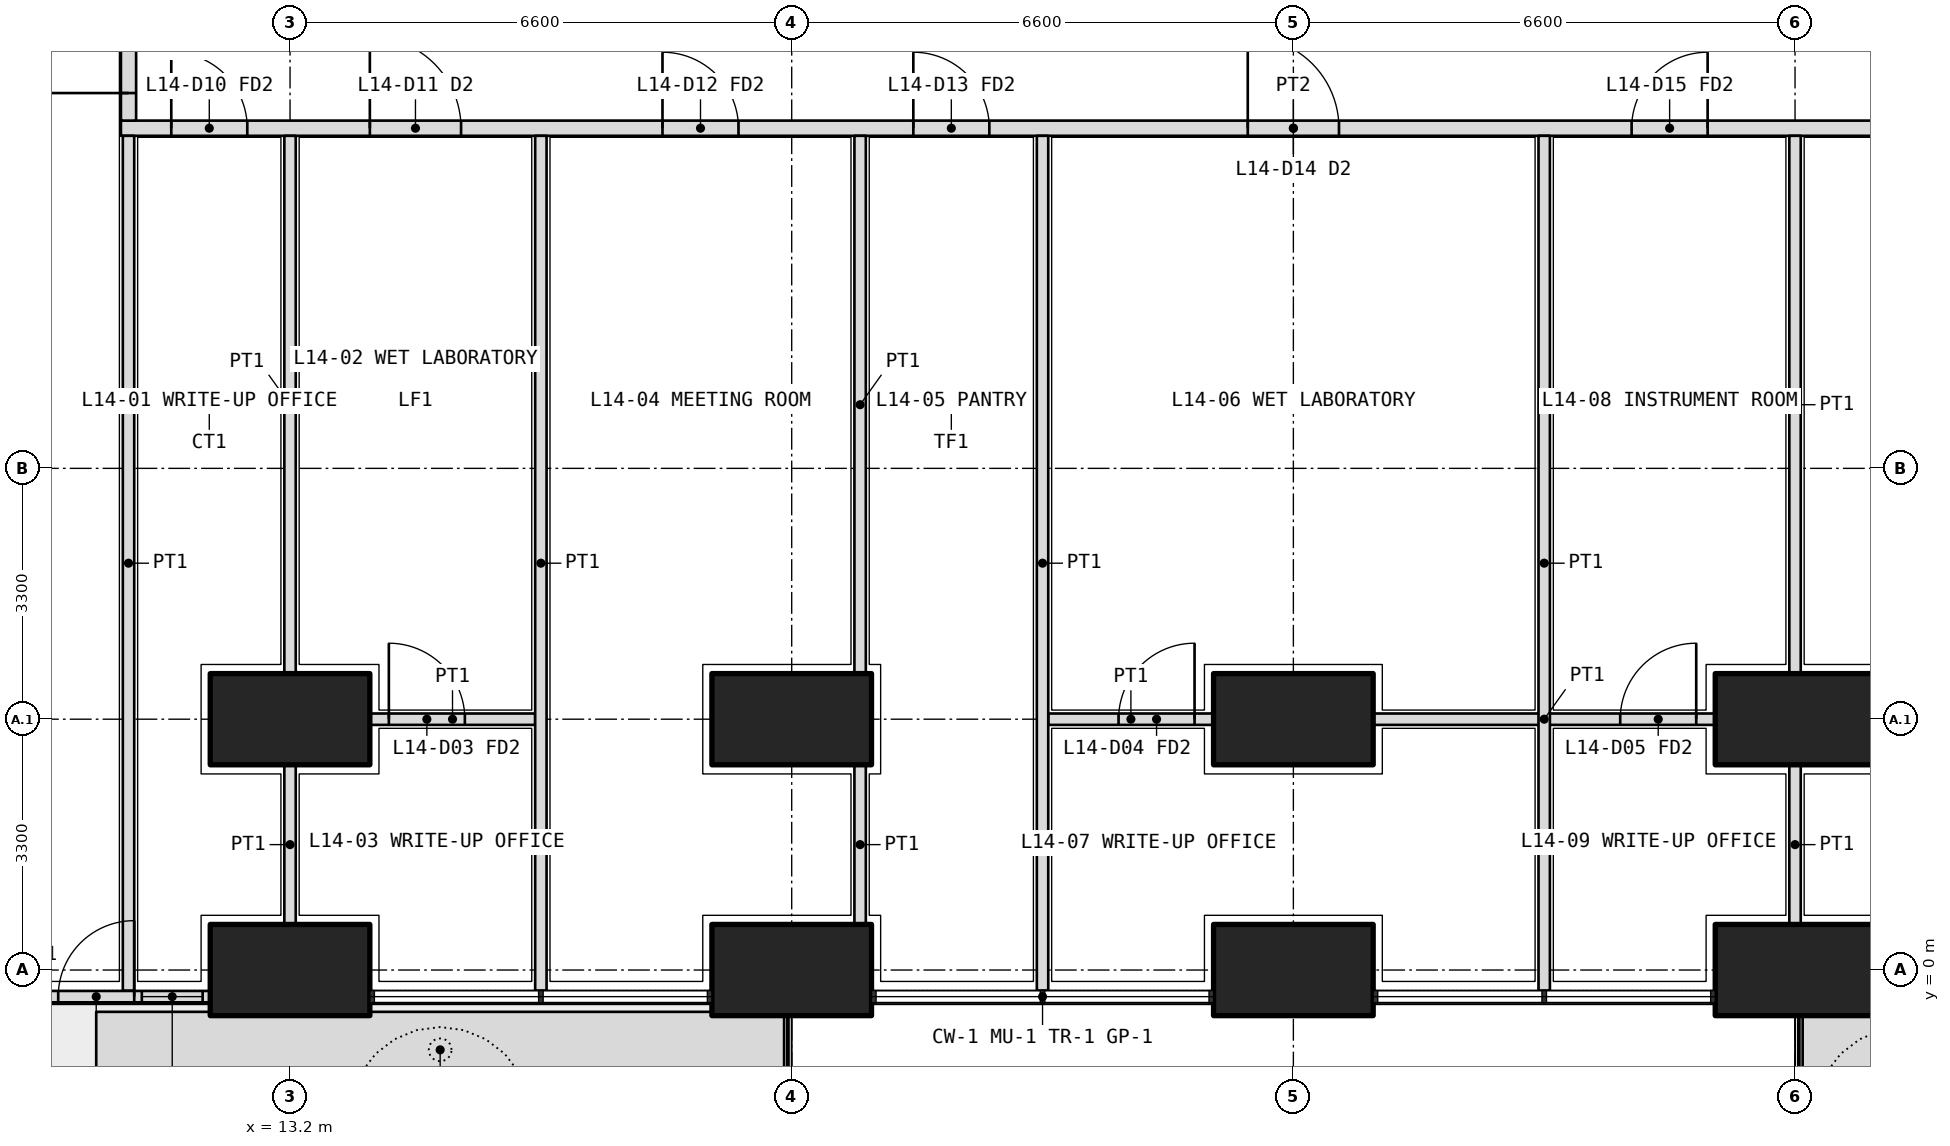
"""IFC4 building model, lengths in metres.
Left out: names, types, materials, properties, quantities, classifications, styles, units other than length and angle.
Written with IfcOpenShell. Run it as: python <this file> out.ifc"""

import sys

from ifc_helpers import new_model, si_unit, direction, frame, frame_2d, origin, origin_2d, place, context, subcontext, project, spatial, polyline, rectangle, outline, extrude, element, fill, save


model = new_model("IFC4")
c1 = context("Model", 3, precision=1e-05, world=origin(), true_north=direction((0.0, 1.0)))
c2 = subcontext(c1, "Body", "Model", "MODEL_VIEW")
j1 = project(units=[si_unit("LENGTHUNIT", "METRE"), si_unit("PLANEANGLEUNIT", "RADIAN")], contexts=[c1])
p1 = place(None, origin())
s1 = spatial("IfcSite", under=j1, at=p1, CompositionType="ELEMENT")
p2 = place(p1, origin())
s2 = spatial("IfcBuilding", under=s1, at=p2, CompositionType="ELEMENT")
p3 = place(p2, frame((0.0, 0.0, 63.3)))
s3 = spatial("IfcBuildingStorey", under=s2, at=p3, CompositionType="ELEMENT", Elevation=63.3)
for number, where, z_axis, x_axis in (
    (1, (13.2, 0.0, 0.0), (0.0, 0.0, 1.0), (1.0, 0.0, 0.0)),
    (2, (19.8, 0.0, 0.0), (0.0, 0.0, 1.0), (1.0, 0.0, 0.0)),
    (3, (26.4, 0.0, 0.0), (0.0, 0.0, 1.0), (1.0, 0.0, 0.0)),
    (4, (33.0, 0.0, 0.0), (0.0, 0.0, 1.0), (1.0, 0.0, 0.0)),
    (5, (13.2, 3.3, 0.0), (0.0, 0.0, 1.0), (1.0, 0.0, 0.0)),
    (6, (19.8, 3.3, 0.0), (0.0, 0.0, 1.0), (1.0, 0.0, 0.0)),
    (7, (26.4, 3.3, 0.0), (0.0, 0.0, 1.0), (1.0, 0.0, 0.0)),
    (8, (33.0, 3.3, 0.0), (0.0, 0.0, 1.0), (1.0, 0.0, 0.0)),
):
    element("IfcColumn", number, at=place(p3, frame(where, z_axis=z_axis, x_axis=x_axis)), inside=s3, PredefinedType="COLUMN", context=c2, shape_type="SweptSolid", body=[
        extrude(rectangle(XDim=2.1, YDim=1.2, at=origin_2d()), origin(), (0.0, 0.0, 1.0), 4.2),
    ])
p4 = place(p3, origin())
e9 = element("IfcWall", 9, at=p4, inside=s3, PredefinedType="USERDEFINED", context=c2, shape_type="SweptSolid", body=[
    extrude(outline(polyline([(10.65, -1.55), (19.7, -1.55), (19.7, -0.55), (10.65, -0.55), (10.65, -1.55)]), holes=[polyline([(10.8, -1.4), (19.55, -1.4), (19.55, -0.7), (10.8, -0.7), (10.8, -1.4)])]), origin(), (0.0, 0.0, 1.0), 1.05),
])
p5 = place(p3, origin())
e10 = element("IfcWall", 10, at=p5, inside=s3, PredefinedType="USERDEFINED", context=c2, shape_type="SweptSolid", body=[
    extrude(outline(polyline([(33.1, -1.55), (35.55, -1.55), (35.55, -0.55), (33.1, -0.55), (33.1, -1.55)]), holes=[polyline([(33.25, -1.4), (35.4, -1.4), (35.4, -0.7), (33.25, -0.7), (33.25, -1.4)])]), origin(), (0.0, 0.0, 1.0), 1.05),
])
p6 = place(p3, frame((7.65, -0.35, 0.0), z_axis=(0.0, 0.0, 1.0), x_axis=(1.0, 0.0, 0.0)))
e11 = element("IfcWall", 11, at=p6, inside=s3, PredefinedType="SOLIDWALL", context=c2, shape_type="SweptSolid", body=[
    extrude(rectangle(XDim=4.5, YDim=0.15, at=frame_2d((2.25, 0.0))), origin(), (0.0, 0.0, 1.0), 2.6),
])
p7 = place(p6, frame((2.5, 0.0, 0.0)))
e12 = element("IfcOpeningElement", 12, at=p7, cuts=e11, PredefinedType="OPENING", context=c2, shape_type="SweptSolid", body=[
    extrude(rectangle(XDim=1.0, YDim=2.4, at=frame_2d((0.5, 1.2))), frame((0.0, 0.085, 0.0), z_axis=(0.0, -1.0, 0.0), x_axis=(1.0, 0.0, 0.0)), (0.0, 0.0, 1.0), 0.17),
])
p8 = place(p6, frame((0.1, 0.0, 0.1)))
e13 = element("IfcOpeningElement", 13, at=p8, cuts=e11, PredefinedType="OPENING", context=c2, shape_type="SweptSolid", body=[
    extrude(rectangle(XDim=1.9, YDim=2.2, at=frame_2d((0.95, 1.1))), frame((0.0, 0.085, 0.0), z_axis=(0.0, -1.0, 0.0), x_axis=(1.0, 0.0, 0.0)), (0.0, 0.0, 1.0), 0.17),
])
p9 = place(p6, frame((3.6, 0.0, 0.1)))
e14 = element("IfcOpeningElement", 14, at=p9, cuts=e11, PredefinedType="OPENING", context=c2, shape_type="SweptSolid", body=[
    extrude(rectangle(XDim=0.8, YDim=2.2, at=frame_2d((0.4, 1.1))), frame((0.0, 0.085, 0.0), z_axis=(0.0, -1.0, 0.0), x_axis=(1.0, 0.0, 0.0)), (0.0, 0.0, 1.0), 0.17),
])
p10 = place(p3, frame((10.975, 11.075, 0.0), z_axis=(0.0, 0.0, 1.0), x_axis=(1.0, 0.0, 0.0)))
e15 = element("IfcWall", 15, at=p10, inside=s3, PredefinedType="PARTITIONING", context=c2, shape_type="SweptSolid", body=[
    extrude(rectangle(XDim=30.85, YDim=0.2, at=frame_2d((15.425, 0.0))), origin(), (0.0, 0.0, 1.0), 2.85),
])
p11 = place(p10, frame((0.663, 0.0, 0.0)))
e16 = element("IfcOpeningElement", 16, at=p11, cuts=e15, PredefinedType="OPENING", context=c2, shape_type="SweptSolid", body=[
    extrude(rectangle(XDim=1.0, YDim=2.1, at=frame_2d((0.5, 1.05))), frame((0.0, 0.11, 0.0), z_axis=(0.0, -1.0, 0.0), x_axis=(1.0, 0.0, 0.0)), (0.0, 0.0, 1.0), 0.22),
])
p12 = place(p10, frame((3.275, 0.0, 0.0)))
e17 = element("IfcOpeningElement", 17, at=p12, cuts=e15, PredefinedType="OPENING", context=c2, shape_type="SweptSolid", body=[
    extrude(rectangle(XDim=1.2, YDim=2.1, at=frame_2d((0.6, 1.05))), frame((0.0, 0.11, 0.0), z_axis=(0.0, -1.0, 0.0), x_axis=(1.0, 0.0, 0.0)), (0.0, 0.0, 1.0), 0.22),
])
p13 = place(p10, frame((7.125, 0.0, 0.0)))
e18 = element("IfcOpeningElement", 18, at=p13, cuts=e15, PredefinedType="OPENING", context=c2, shape_type="SweptSolid", body=[
    extrude(rectangle(XDim=1.0, YDim=2.1, at=frame_2d((0.5, 1.05))), frame((0.0, 0.11, 0.0), z_axis=(0.0, -1.0, 0.0), x_axis=(1.0, 0.0, 0.0)), (0.0, 0.0, 1.0), 0.22),
])
p14 = place(p10, frame((10.425, 0.0, 0.0)))
e19 = element("IfcOpeningElement", 19, at=p14, cuts=e15, PredefinedType="OPENING", context=c2, shape_type="SweptSolid", body=[
    extrude(rectangle(XDim=1.0, YDim=2.1, at=frame_2d((0.5, 1.05))), frame((0.0, 0.11, 0.0), z_axis=(0.0, -1.0, 0.0), x_axis=(1.0, 0.0, 0.0)), (0.0, 0.0, 1.0), 0.22),
])
p15 = place(p10, frame((14.825, 0.0, 0.0)))
e20 = element("IfcOpeningElement", 20, at=p15, cuts=e15, PredefinedType="OPENING", context=c2, shape_type="SweptSolid", body=[
    extrude(rectangle(XDim=1.2, YDim=2.1, at=frame_2d((0.6, 1.05))), frame((0.0, 0.11, 0.0), z_axis=(0.0, -1.0, 0.0), x_axis=(1.0, 0.0, 0.0)), (0.0, 0.0, 1.0), 0.22),
])
p16 = place(p10, frame((19.875, 0.0, 0.0)))
e21 = element("IfcOpeningElement", 21, at=p16, cuts=e15, PredefinedType="OPENING", context=c2, shape_type="SweptSolid", body=[
    extrude(rectangle(XDim=1.0, YDim=2.1, at=frame_2d((0.5, 1.05))), frame((0.0, 0.11, 0.0), z_axis=(0.0, -1.0, 0.0), x_axis=(1.0, 0.0, 0.0)), (0.0, 0.0, 1.0), 0.22),
])
p17 = place(p10, frame((25.887, 0.0, 0.0)))
e22 = element("IfcOpeningElement", 22, at=p17, cuts=e15, PredefinedType="OPENING", context=c2, shape_type="SweptSolid", body=[
    extrude(rectangle(XDim=1.0, YDim=2.1, at=frame_2d((0.5, 1.05))), frame((0.0, 0.11, 0.0), z_axis=(0.0, -1.0, 0.0), x_axis=(1.0, 0.0, 0.0)), (0.0, 0.0, 1.0), 0.22),
])
p18 = place(p3, frame((11.075, 11.175, 0.0), z_axis=(0.0, 0.0, 1.0), x_axis=(0.0, 1.0, 0.0)))
e23 = element("IfcWall", 23, at=p18, inside=s3, PredefinedType="PARTITIONING", context=c2, shape_type="SweptSolid", body=[
    extrude(rectangle(XDim=23.85, YDim=0.2, at=frame_2d((11.925, 0.0))), origin(), (0.0, 0.0, 1.0), 2.85),
])
p19 = place(p18, frame((0.363, 0.0, 0.0)))
e24 = element("IfcOpeningElement", 24, at=p19, cuts=e23, PredefinedType="OPENING", context=c2, shape_type="SweptSolid", body=[
    extrude(rectangle(XDim=1.2, YDim=2.1, at=frame_2d((0.6, 1.05))), frame((0.0, 0.11, 0.0), z_axis=(0.0, -1.0, 0.0), x_axis=(1.0, 0.0, 0.0)), (0.0, 0.0, 1.0), 0.22),
])
p20 = place(p18, frame((2.575, 0.0, 0.0)))
e25 = element("IfcOpeningElement", 25, at=p20, cuts=e23, PredefinedType="OPENING", context=c2, shape_type="SweptSolid", body=[
    extrude(rectangle(XDim=1.0, YDim=2.1, at=frame_2d((0.5, 1.05))), frame((0.0, 0.11, 0.0), z_axis=(0.0, -1.0, 0.0), x_axis=(1.0, 0.0, 0.0)), (0.0, 0.0, 1.0), 0.22),
])
p21 = place(p18, frame((5.625, 0.0, 0.0)))
e26 = element("IfcOpeningElement", 26, at=p21, cuts=e23, PredefinedType="OPENING", context=c2, shape_type="SweptSolid", body=[
    extrude(rectangle(XDim=0.9, YDim=2.1, at=frame_2d((0.45, 1.05))), frame((0.0, 0.11, 0.0), z_axis=(0.0, -1.0, 0.0), x_axis=(1.0, 0.0, 0.0)), (0.0, 0.0, 1.0), 0.22),
])
p22 = place(p18, frame((9.425, 0.0, 0.0)))
e27 = element("IfcOpeningElement", 27, at=p22, cuts=e23, PredefinedType="OPENING", context=c2, shape_type="SweptSolid", body=[
    extrude(rectangle(XDim=0.9, YDim=2.1, at=frame_2d((0.45, 1.05))), frame((0.0, 0.11, 0.0), z_axis=(0.0, -1.0, 0.0), x_axis=(1.0, 0.0, 0.0)), (0.0, 0.0, 1.0), 0.22),
])
p23 = place(p18, frame((12.975, 0.0, 0.0)))
e28 = element("IfcOpeningElement", 28, at=p23, cuts=e23, PredefinedType="OPENING", context=c2, shape_type="SweptSolid", body=[
    extrude(rectangle(XDim=1.0, YDim=2.1, at=frame_2d((0.5, 1.05))), frame((0.0, 0.11, 0.0), z_axis=(0.0, -1.0, 0.0), x_axis=(1.0, 0.0, 0.0)), (0.0, 0.0, 1.0), 0.22),
])
p24 = place(p18, frame((18.025, 0.0, 0.0)))
e29 = element("IfcOpeningElement", 29, at=p24, cuts=e23, PredefinedType="OPENING", context=c2, shape_type="SweptSolid", body=[
    extrude(rectangle(XDim=1.0, YDim=2.1, at=frame_2d((0.5, 1.05))), frame((0.0, 0.11, 0.0), z_axis=(0.0, -1.0, 0.0), x_axis=(1.0, 0.0, 0.0)), (0.0, 0.0, 1.0), 0.22),
])
p25 = place(p18, frame((22.387, 0.0, 0.0)))
e30 = element("IfcOpeningElement", 30, at=p25, cuts=e23, PredefinedType="OPENING", context=c2, shape_type="SweptSolid", body=[
    extrude(rectangle(XDim=1.0, YDim=2.1, at=frame_2d((0.5, 1.05))), frame((0.0, 0.11, 0.0), z_axis=(0.0, -1.0, 0.0), x_axis=(1.0, 0.0, 0.0)), (0.0, 0.0, 1.0), 0.22),
])
p26 = place(p3, frame((11.075, -0.27, 0.0), z_axis=(0.0, 0.0, 1.0), x_axis=(0.0, 1.0, 0.0)))
e31 = element("IfcWall", 31, at=p26, inside=s3, PredefinedType="PARTITIONING", context=c2, shape_type="SweptSolid", body=[
    extrude(rectangle(XDim=11.245, YDim=0.15, at=frame_2d((5.623, 0.0))), origin(), (0.0, 0.0, 1.0), 2.6),
])
p27 = place(p3, frame((14.25, 3.3, 0.0), z_axis=(0.0, 0.0, 1.0), x_axis=(1.0, 0.0, 0.0)))
e32 = element("IfcWall", 32, at=p27, inside=s3, PredefinedType="PARTITIONING", context=c2, shape_type="SweptSolid", body=[
    extrude(rectangle(XDim=2.175, YDim=0.15, at=frame_2d((1.087, 0.0))), origin(), (0.0, 0.0, 1.0), 3.9),
])
p28 = place(p27, frame((0.25, 0.0, 0.0)))
e33 = element("IfcOpeningElement", 33, at=p28, cuts=e32, PredefinedType="OPENING", context=c2, shape_type="SweptSolid", body=[
    extrude(rectangle(XDim=1.0, YDim=2.1, at=frame_2d((0.5, 1.05))), frame((0.0, 0.085, 0.0), z_axis=(0.0, -1.0, 0.0), x_axis=(1.0, 0.0, 0.0)), (0.0, 0.0, 1.0), 0.17),
])
p29 = place(p3, frame((23.175, 3.3, 0.0), z_axis=(0.0, 0.0, 1.0), x_axis=(1.0, 0.0, 0.0)))
e34 = element("IfcWall", 34, at=p29, inside=s3, PredefinedType="PARTITIONING", context=c2, shape_type="SweptSolid", body=[
    extrude(rectangle(XDim=2.175, YDim=0.15, at=frame_2d((1.087, 0.0))), origin(), (0.0, 0.0, 1.0), 3.9),
])
p30 = place(p29, frame((0.925, 0.0, 0.0)))
e35 = element("IfcOpeningElement", 35, at=p30, cuts=e34, PredefinedType="OPENING", context=c2, shape_type="SweptSolid", body=[
    extrude(rectangle(XDim=1.0, YDim=2.1, at=frame_2d((0.5, 1.05))), frame((0.0, 0.085, 0.0), z_axis=(0.0, -1.0, 0.0), x_axis=(1.0, 0.0, 0.0)), (0.0, 0.0, 1.0), 0.17),
])
p31 = place(p3, frame((27.45, 3.3, 0.0), z_axis=(0.0, 0.0, 1.0), x_axis=(1.0, 0.0, 0.0)))
e36 = element("IfcWall", 36, at=p31, inside=s3, PredefinedType="PARTITIONING", context=c2, shape_type="SweptSolid", body=[
    extrude(rectangle(XDim=4.5, YDim=0.15, at=frame_2d((2.25, 0.0))), origin(), (0.0, 0.0, 1.0), 3.9),
])
p32 = place(p31, frame((3.25, 0.0, 0.0)))
e37 = element("IfcOpeningElement", 37, at=p32, cuts=e36, PredefinedType="OPENING", context=c2, shape_type="SweptSolid", body=[
    extrude(rectangle(XDim=1.0, YDim=2.1, at=frame_2d((0.5, 1.05))), frame((0.0, 0.085, 0.0), z_axis=(0.0, -1.0, 0.0), x_axis=(1.0, 0.0, 0.0)), (0.0, 0.0, 1.0), 0.17),
])
p33 = place(p3, frame((20.7, 0.6, 0.0), z_axis=(0.0, 0.0, 1.0), x_axis=(0.0, 1.0, 0.0)))
e38 = element("IfcWall", 38, at=p33, inside=s3, PredefinedType="PARTITIONING", context=c2, shape_type="SweptSolid", body=[
    extrude(rectangle(XDim=2.1, YDim=0.15, at=frame_2d((1.05, 0.0))), origin(), (0.0, 0.0, 1.0), 2.85),
])
p34 = place(p3, frame((20.7, 3.9, 0.0), z_axis=(0.0, 0.0, 1.0), x_axis=(0.0, 1.0, 0.0)))
e39 = element("IfcWall", 39, at=p34, inside=s3, PredefinedType="PARTITIONING", context=c2, shape_type="SweptSolid", body=[
    extrude(rectangle(XDim=7.075, YDim=0.15, at=frame_2d((3.538, 0.0))), origin(), (0.0, 0.0, 1.0), 3.9),
])
p35 = place(p3, frame((23.1, -0.27, 0.0), z_axis=(0.0, 0.0, 1.0), x_axis=(0.0, 1.0, 0.0)))
e40 = element("IfcWall", 40, at=p35, inside=s3, PredefinedType="PARTITIONING", context=c2, shape_type="SweptSolid", body=[
    extrude(rectangle(XDim=11.245, YDim=0.15, at=frame_2d((5.623, 0.0))), origin(), (0.0, 0.0, 1.0), 2.6),
])
p36 = place(p3, frame((13.2, 0.6, 0.0), z_axis=(0.0, 0.0, 1.0), x_axis=(0.0, 1.0, 0.0)))
e41 = element("IfcWall", 41, at=p36, inside=s3, PredefinedType="PARTITIONING", context=c2, shape_type="SweptSolid", body=[
    extrude(rectangle(XDim=2.1, YDim=0.15, at=frame_2d((1.05, 0.0))), origin(), (0.0, 0.0, 1.0), 2.85),
])
p37 = place(p3, frame((13.2, 3.9, 0.0), z_axis=(0.0, 0.0, 1.0), x_axis=(0.0, 1.0, 0.0)))
e42 = element("IfcWall", 42, at=p37, inside=s3, PredefinedType="PARTITIONING", context=c2, shape_type="SweptSolid", body=[
    extrude(rectangle(XDim=7.075, YDim=0.15, at=frame_2d((3.538, 0.0))), origin(), (0.0, 0.0, 1.0), 2.85),
])
for number, where, z_axis, x_axis in (
    (43, (16.5, -0.27, 0.0), (0.0, 0.0, 1.0), (0.0, 1.0, 0.0)),
    (44, (29.7, -0.27, 0.0), (0.0, 0.0, 1.0), (0.0, 1.0, 0.0)),
):
    element("IfcWall", number, at=place(p3, frame(where, z_axis=z_axis, x_axis=x_axis)), inside=s3, PredefinedType="PARTITIONING", context=c2, shape_type="SweptSolid", body=[
        extrude(rectangle(XDim=11.245, YDim=0.15, at=frame_2d((5.623, 0.0))), origin(), (0.0, 0.0, 1.0), 2.6),
    ])
p38 = place(p3, frame((33.0, 0.6, 0.0), z_axis=(0.0, 0.0, 1.0), x_axis=(0.0, 1.0, 0.0)))
e45 = element("IfcWall", 45, at=p38, inside=s3, PredefinedType="PARTITIONING", context=c2, shape_type="SweptSolid", body=[
    extrude(rectangle(XDim=2.1, YDim=0.15, at=frame_2d((1.05, 0.0))), origin(), (0.0, 0.0, 1.0), 2.85),
])
p39 = place(p3, frame((33.0, 3.9, 0.0), z_axis=(0.0, 0.0, 1.0), x_axis=(0.0, 1.0, 0.0)))
e46 = element("IfcWall", 46, at=p39, inside=s3, PredefinedType="PARTITIONING", context=c2, shape_type="SweptSolid", body=[
    extrude(rectangle(XDim=7.075, YDim=0.15, at=frame_2d((3.538, 0.0))), origin(), (0.0, 0.0, 1.0), 2.85),
])
p40 = place(p7, origin())
e47 = element("IfcDoor", 47, at=p40, inside=s3, OperationType="SINGLE_SWING_RIGHT", PredefinedType="DOOR", context=c2, shape_type="SweptSolid", body=[
    extrude(rectangle(XDim=1.0, YDim=2.4, at=frame_2d((0.5, 1.2))), frame((0.0, 0.025, 0.0), z_axis=(0.0, -1.0, 0.0), x_axis=(1.0, 0.0, 0.0)), (0.0, 0.0, 1.0), 0.05),
])
fill(e12, e47)
p41 = place(p9, origin())
e48 = element("IfcWindow", 48, at=p41, inside=s3, PartitioningType="SINGLE_PANEL", PredefinedType="WINDOW", context=c2, shape_type="SweptSolid", body=[
    extrude(rectangle(XDim=0.8, YDim=2.2, at=frame_2d((0.4, 1.1))), frame((0.0, 0.03, 0.0), z_axis=(0.0, -1.0, 0.0), x_axis=(1.0, 0.0, 0.0)), (0.0, 0.0, 1.0), 0.06),
])
fill(e14, e48)
p42 = place(p11, origin())
e49 = element("IfcDoor", 49, at=p42, inside=s3, OperationType="SINGLE_SWING_LEFT", PredefinedType="DOOR", context=c2, shape_type="SweptSolid", body=[
    extrude(rectangle(XDim=1.0, YDim=2.1, at=frame_2d((0.5, 1.05))), frame((0.0, 0.025, 0.0), z_axis=(0.0, -1.0, 0.0), x_axis=(1.0, 0.0, 0.0)), (0.0, 0.0, 1.0), 0.05),
])
fill(e16, e49)
p43 = place(p12, origin())
e50 = element("IfcDoor", 50, at=p43, inside=s3, OperationType="DOUBLE_DOOR_SINGLE_SWING", PredefinedType="DOOR", context=c2, shape_type="SweptSolid", body=[
    extrude(rectangle(XDim=1.2, YDim=2.1, at=frame_2d((0.6, 1.05))), frame((0.0, 0.025, 0.0), z_axis=(0.0, -1.0, 0.0), x_axis=(1.0, 0.0, 0.0)), (0.0, 0.0, 1.0), 0.05),
])
fill(e17, e50)
p44 = place(p28, origin())
e51 = element("IfcDoor", 51, at=p44, inside=s3, OperationType="SINGLE_SWING_LEFT", PredefinedType="DOOR", context=c2, shape_type="SweptSolid", body=[
    extrude(rectangle(XDim=1.0, YDim=2.1, at=frame_2d((0.5, 1.05))), frame((0.0, 0.025, 0.0), z_axis=(0.0, -1.0, 0.0), x_axis=(1.0, 0.0, 0.0)), (0.0, 0.0, 1.0), 0.05),
])
fill(e33, e51)
p45 = place(p13, origin())
e52 = element("IfcDoor", 52, at=p45, inside=s3, OperationType="SINGLE_SWING_LEFT", PredefinedType="DOOR", context=c2, shape_type="SweptSolid", body=[
    extrude(rectangle(XDim=1.0, YDim=2.1, at=frame_2d((0.5, 1.05))), frame((0.0, 0.025, 0.0), z_axis=(0.0, -1.0, 0.0), x_axis=(1.0, 0.0, 0.0)), (0.0, 0.0, 1.0), 0.05),
])
fill(e18, e52)
p46 = place(p14, origin())
e53 = element("IfcDoor", 53, at=p46, inside=s3, OperationType="SINGLE_SWING_LEFT", PredefinedType="DOOR", context=c2, shape_type="SweptSolid", body=[
    extrude(rectangle(XDim=1.0, YDim=2.1, at=frame_2d((0.5, 1.05))), frame((0.0, 0.025, 0.0), z_axis=(0.0, -1.0, 0.0), x_axis=(1.0, 0.0, 0.0)), (0.0, 0.0, 1.0), 0.05),
])
fill(e19, e53)
p47 = place(p15, origin())
e54 = element("IfcDoor", 54, at=p47, inside=s3, OperationType="DOUBLE_DOOR_SINGLE_SWING", PredefinedType="DOOR", context=c2, shape_type="SweptSolid", body=[
    extrude(rectangle(XDim=1.2, YDim=2.1, at=frame_2d((0.6, 1.05))), frame((0.0, 0.025, 0.0), z_axis=(0.0, -1.0, 0.0), x_axis=(1.0, 0.0, 0.0)), (0.0, 0.0, 1.0), 0.05),
])
fill(e20, e54)
p48 = place(p30, origin())
e55 = element("IfcDoor", 55, at=p48, inside=s3, OperationType="SINGLE_SWING_RIGHT", PredefinedType="DOOR", context=c2, shape_type="SweptSolid", body=[
    extrude(rectangle(XDim=1.0, YDim=2.1, at=frame_2d((0.5, 1.05))), frame((0.0, 0.025, 0.0), z_axis=(0.0, -1.0, 0.0), x_axis=(1.0, 0.0, 0.0)), (0.0, 0.0, 1.0), 0.05),
])
fill(e35, e55)
p49 = place(p16, origin())
e56 = element("IfcDoor", 56, at=p49, inside=s3, OperationType="SINGLE_SWING_RIGHT", PredefinedType="DOOR", context=c2, shape_type="SweptSolid", body=[
    extrude(rectangle(XDim=1.0, YDim=2.1, at=frame_2d((0.5, 1.05))), frame((0.0, 0.025, 0.0), z_axis=(0.0, -1.0, 0.0), x_axis=(1.0, 0.0, 0.0)), (0.0, 0.0, 1.0), 0.05),
])
fill(e21, e56)
p50 = place(p32, origin())
e57 = element("IfcDoor", 57, at=p50, inside=s3, OperationType="SINGLE_SWING_RIGHT", PredefinedType="DOOR", context=c2, shape_type="SweptSolid", body=[
    extrude(rectangle(XDim=1.0, YDim=2.1, at=frame_2d((0.5, 1.05))), frame((0.0, 0.025, 0.0), z_axis=(0.0, -1.0, 0.0), x_axis=(1.0, 0.0, 0.0)), (0.0, 0.0, 1.0), 0.05),
])
fill(e37, e57)
p51 = place(p19, origin())
e58 = element("IfcDoor", 58, at=p51, inside=s3, OperationType="DOUBLE_DOOR_SINGLE_SWING", PredefinedType="DOOR", context=c2, shape_type="SweptSolid", body=[
    extrude(rectangle(XDim=1.2, YDim=2.1, at=frame_2d((0.6, 1.05))), frame((0.0, 0.025, 0.0), z_axis=(0.0, -1.0, 0.0), x_axis=(1.0, 0.0, 0.0)), (0.0, 0.0, 1.0), 0.05),
])
fill(e24, e58)
save(model, sys.argv[1])
